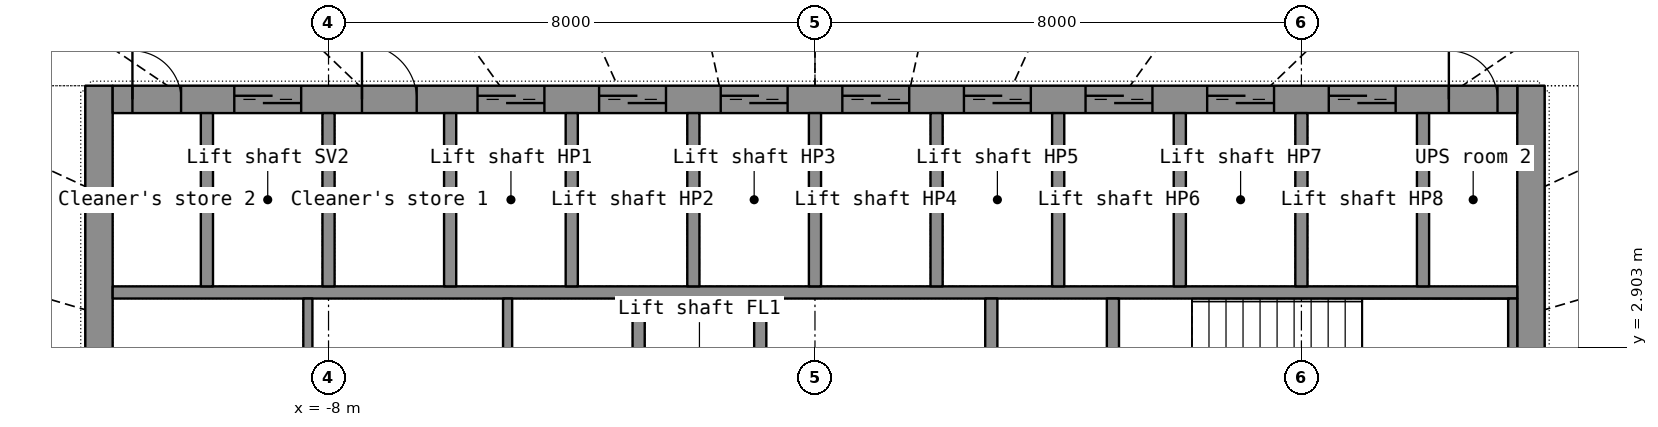
"""IFC4 building model, lengths in metres.
Left out: names, types, materials, properties, quantities, classifications, styles, units other than length and angle.
Written with IfcOpenShell. Run it as: python <this file> out.ifc"""

import sys

from ifc_helpers import new_model, si_unit, direction, frame, frame_2d, origin, place, context, subcontext, project, spatial, rectangle, extrude, element, fill, save


model = new_model("IFC4")
c1 = context("Model", 3, precision=1e-05, world=origin(), true_north=direction((0.0, 1.0)))
c2 = subcontext(c1, "Body", "Model", "MODEL_VIEW")
j1 = project(units=[si_unit("LENGTHUNIT", "METRE"), si_unit("PLANEANGLEUNIT", "RADIAN")], contexts=[c1])
p1 = place(None, origin())
s1 = spatial("IfcSite", under=j1, at=p1, CompositionType="ELEMENT")
p2 = place(p1, origin())
s2 = spatial("IfcBuilding", under=s1, at=p2, CompositionType="ELEMENT")
p3 = place(p2, frame((0.0, 0.0, 190.4)))
s3 = spatial("IfcBuildingStorey", under=s2, at=p3, CompositionType="ELEMENT", Elevation=190.4)
p4 = place(p3, frame((-11.775, -7.2, 0.0), z_axis=(0.0, 0.0, 1.0), x_axis=(0.0, 1.0, 0.0)))
e1 = element("IfcWall", 1, at=p4, inside=s3, PredefinedType="SHEAR", context=c2, shape_type="SweptSolid", body=[
    extrude(rectangle(XDim=14.4, YDim=0.45, at=frame_2d((7.2, 0.0))), origin(), (0.0, 0.0, 1.0), 3.3),
])
p5 = place(p4, frame((6.5, 0.0, 0.0)))
e2 = element("IfcOpeningElement", 2, at=p5, cuts=e1, PredefinedType="OPENING", context=c2, shape_type="SweptSolid", body=[
    extrude(rectangle(XDim=1.4, YDim=2.2, at=frame_2d((0.7, 1.1))), frame((0.0, 0.235, 0.0), z_axis=(0.0, -1.0, 0.0), x_axis=(1.0, 0.0, 0.0)), (0.0, 0.0, 1.0), 0.47),
])
p6 = place(p3, frame((11.775, -7.2, 0.0), z_axis=(0.0, 0.0, 1.0), x_axis=(0.0, 1.0, 0.0)))
e3 = element("IfcWall", 3, at=p6, inside=s3, PredefinedType="SHEAR", context=c2, shape_type="SweptSolid", body=[
    extrude(rectangle(XDim=14.4, YDim=0.45, at=frame_2d((7.2, 0.0))), origin(), (0.0, 0.0, 1.0), 3.3),
])
p7 = place(p6, frame((6.5, 0.0, 0.0)))
e4 = element("IfcOpeningElement", 4, at=p7, cuts=e3, PredefinedType="OPENING", context=c2, shape_type="SweptSolid", body=[
    extrude(rectangle(XDim=1.4, YDim=2.2, at=frame_2d((0.7, 1.1))), frame((0.0, 0.235, 0.0), z_axis=(0.0, -1.0, 0.0), x_axis=(1.0, 0.0, 0.0)), (0.0, 0.0, 1.0), 0.47),
])
p8 = place(p3, frame((-11.55, 6.975, 0.0), z_axis=(0.0, 0.0, 1.0), x_axis=(1.0, 0.0, 0.0)))
e5 = element("IfcWall", 5, at=p8, inside=s3, PredefinedType="SHEAR", context=c2, shape_type="SweptSolid", body=[
    extrude(rectangle(XDim=23.1, YDim=0.45, at=frame_2d((11.55, 0.0))), origin(), (0.0, 0.0, 1.0), 3.3),
])
p9 = place(p8, frame((2.0, 0.0, 0.0)))
e6 = element("IfcOpeningElement", 6, at=p9, cuts=e5, PredefinedType="OPENING", context=c2, shape_type="SweptSolid", body=[
    extrude(rectangle(XDim=1.1, YDim=2.2, at=frame_2d((0.55, 1.1))), frame((0.0, 0.235, 0.0), z_axis=(0.0, -1.0, 0.0), x_axis=(1.0, 0.0, 0.0)), (0.0, 0.0, 1.0), 0.47),
])
p10 = place(p8, frame((6.0, 0.0, 0.0)))
e7 = element("IfcOpeningElement", 7, at=p10, cuts=e5, PredefinedType="OPENING", context=c2, shape_type="SweptSolid", body=[
    extrude(rectangle(XDim=1.1, YDim=2.2, at=frame_2d((0.55, 1.1))), frame((0.0, 0.235, 0.0), z_axis=(0.0, -1.0, 0.0), x_axis=(1.0, 0.0, 0.0)), (0.0, 0.0, 1.0), 0.47),
])
p11 = place(p8, frame((8.0, 0.0, 0.0)))
e8 = element("IfcOpeningElement", 8, at=p11, cuts=e5, PredefinedType="OPENING", context=c2, shape_type="SweptSolid", body=[
    extrude(rectangle(XDim=1.1, YDim=2.2, at=frame_2d((0.55, 1.1))), frame((0.0, 0.235, 0.0), z_axis=(0.0, -1.0, 0.0), x_axis=(1.0, 0.0, 0.0)), (0.0, 0.0, 1.0), 0.47),
])
p12 = place(p8, frame((10.0, 0.0, 0.0)))
e9 = element("IfcOpeningElement", 9, at=p12, cuts=e5, PredefinedType="OPENING", context=c2, shape_type="SweptSolid", body=[
    extrude(rectangle(XDim=1.1, YDim=2.2, at=frame_2d((0.55, 1.1))), frame((0.0, 0.235, 0.0), z_axis=(0.0, -1.0, 0.0), x_axis=(1.0, 0.0, 0.0)), (0.0, 0.0, 1.0), 0.47),
])
p13 = place(p8, frame((12.0, 0.0, 0.0)))
e10 = element("IfcOpeningElement", 10, at=p13, cuts=e5, PredefinedType="OPENING", context=c2, shape_type="SweptSolid", body=[
    extrude(rectangle(XDim=1.1, YDim=2.2, at=frame_2d((0.55, 1.1))), frame((0.0, 0.235, 0.0), z_axis=(0.0, -1.0, 0.0), x_axis=(1.0, 0.0, 0.0)), (0.0, 0.0, 1.0), 0.47),
])
p14 = place(p8, frame((14.0, 0.0, 0.0)))
e11 = element("IfcOpeningElement", 11, at=p14, cuts=e5, PredefinedType="OPENING", context=c2, shape_type="SweptSolid", body=[
    extrude(rectangle(XDim=1.1, YDim=2.2, at=frame_2d((0.55, 1.1))), frame((0.0, 0.235, 0.0), z_axis=(0.0, -1.0, 0.0), x_axis=(1.0, 0.0, 0.0)), (0.0, 0.0, 1.0), 0.47),
])
p15 = place(p8, frame((16.0, 0.0, 0.0)))
e12 = element("IfcOpeningElement", 12, at=p15, cuts=e5, PredefinedType="OPENING", context=c2, shape_type="SweptSolid", body=[
    extrude(rectangle(XDim=1.1, YDim=2.2, at=frame_2d((0.55, 1.1))), frame((0.0, 0.235, 0.0), z_axis=(0.0, -1.0, 0.0), x_axis=(1.0, 0.0, 0.0)), (0.0, 0.0, 1.0), 0.47),
])
p16 = place(p8, frame((18.0, 0.0, 0.0)))
e13 = element("IfcOpeningElement", 13, at=p16, cuts=e5, PredefinedType="OPENING", context=c2, shape_type="SweptSolid", body=[
    extrude(rectangle(XDim=1.1, YDim=2.2, at=frame_2d((0.55, 1.1))), frame((0.0, 0.235, 0.0), z_axis=(0.0, -1.0, 0.0), x_axis=(1.0, 0.0, 0.0)), (0.0, 0.0, 1.0), 0.47),
])
p17 = place(p8, frame((20.0, 0.0, 0.0)))
e14 = element("IfcOpeningElement", 14, at=p17, cuts=e5, PredefinedType="OPENING", context=c2, shape_type="SweptSolid", body=[
    extrude(rectangle(XDim=1.1, YDim=2.2, at=frame_2d((0.55, 1.1))), frame((0.0, 0.235, 0.0), z_axis=(0.0, -1.0, 0.0), x_axis=(1.0, 0.0, 0.0)), (0.0, 0.0, 1.0), 0.47),
])
p18 = place(p8, frame((4.1, 0.0, 0.0)))
e15 = element("IfcOpeningElement", 15, at=p18, cuts=e5, PredefinedType="OPENING", context=c2, shape_type="SweptSolid", body=[
    extrude(rectangle(XDim=0.9, YDim=2.1, at=frame_2d((0.45, 1.05))), frame((0.0, 0.235, 0.0), z_axis=(0.0, -1.0, 0.0), x_axis=(1.0, 0.0, 0.0)), (0.0, 0.0, 1.0), 0.47),
])
p19 = place(p8, frame((0.325, 0.0, 0.0)))
e16 = element("IfcOpeningElement", 16, at=p19, cuts=e5, PredefinedType="OPENING", context=c2, shape_type="SweptSolid", body=[
    extrude(rectangle(XDim=0.8, YDim=2.05, at=frame_2d((0.4, 1.025))), frame((0.0, 0.235, 0.0), z_axis=(0.0, -1.0, 0.0), x_axis=(1.0, 0.0, 0.0)), (0.0, 0.0, 1.0), 0.47),
])
p20 = place(p8, frame((21.975, 0.0, 0.0)))
e17 = element("IfcOpeningElement", 17, at=p20, cuts=e5, PredefinedType="OPENING", context=c2, shape_type="SweptSolid", body=[
    extrude(rectangle(XDim=0.8, YDim=2.05, at=frame_2d((0.4, 1.025))), frame((0.0, 0.235, 0.0), z_axis=(0.0, -1.0, 0.0), x_axis=(1.0, 0.0, 0.0)), (0.0, 0.0, 1.0), 0.47),
])
p21 = place(p3, frame((-11.55, 3.8, 0.0), z_axis=(0.0, 0.0, 1.0), x_axis=(1.0, 0.0, 0.0)))
e18 = element("IfcWall", 18, at=p21, inside=s3, PredefinedType="SHEAR", context=c2, shape_type="SweptSolid", body=[
    extrude(rectangle(XDim=23.1, YDim=0.2, at=frame_2d((11.55, 0.0))), origin(), (0.0, 0.0, 1.0), 3.3),
])
for number, where, z_axis, x_axis in (
    (19, (-10.0, 3.9, 0.0), (0.0, 0.0, 1.0), (0.0, 1.0, 0.0)),
    (20, (-8.0, 3.9, 0.0), (0.0, 0.0, 1.0), (0.0, 1.0, 0.0)),
    (21, (-6.0, 3.9, 0.0), (0.0, 0.0, 1.0), (0.0, 1.0, 0.0)),
    (22, (-4.0, 3.9, 0.0), (0.0, 0.0, 1.0), (0.0, 1.0, 0.0)),
    (23, (-2.0, 3.9, 0.0), (0.0, 0.0, 1.0), (0.0, 1.0, 0.0)),
    (24, (0.0, 3.9, 0.0), (0.0, 0.0, 1.0), (0.0, 1.0, 0.0)),
    (25, (2.0, 3.9, 0.0), (0.0, 0.0, 1.0), (0.0, 1.0, 0.0)),
    (26, (4.0, 3.9, 0.0), (0.0, 0.0, 1.0), (0.0, 1.0, 0.0)),
    (27, (6.0, 3.9, 0.0), (0.0, 0.0, 1.0), (0.0, 1.0, 0.0)),
    (28, (8.0, 3.9, 0.0), (0.0, 0.0, 1.0), (0.0, 1.0, 0.0)),
    (29, (10.0, 3.9, 0.0), (0.0, 0.0, 1.0), (0.0, 1.0, 0.0)),
):
    element("IfcWall", number, at=place(p3, frame(where, z_axis=z_axis, x_axis=x_axis)), inside=s3, PredefinedType="SHEAR", context=c2, shape_type="SweptSolid", body=[
        extrude(rectangle(XDim=2.85, YDim=0.2, at=frame_2d((1.425, 0.0))), origin(), (0.0, 0.0, 1.0), 3.3),
    ])
p22 = place(p3, frame((-2.9, -3.7, 0.0), z_axis=(0.0, 0.0, 1.0), x_axis=(0.0, 1.0, 0.0)))
e30 = element("IfcWall", 30, at=p22, inside=s3, PredefinedType="SHEAR", context=c2, shape_type="SweptSolid", body=[
    extrude(rectangle(XDim=7.4, YDim=0.2, at=frame_2d((3.7, 0.0))), origin(), (0.0, 0.0, 1.0), 3.3),
])
p23 = place(p22, frame((3.1, 0.0, 0.0)))
e31 = element("IfcOpeningElement", 31, at=p23, cuts=e30, PredefinedType="OPENING", context=c2, shape_type="SweptSolid", body=[
    extrude(rectangle(XDim=1.2, YDim=2.2, at=frame_2d((0.6, 1.1))), frame((0.0, 0.11, 0.0), z_axis=(0.0, -1.0, 0.0), x_axis=(1.0, 0.0, 0.0)), (0.0, 0.0, 1.0), 0.22),
])
p24 = place(p3, frame((2.9, -3.7, 0.0), z_axis=(0.0, 0.0, 1.0), x_axis=(0.0, 1.0, 0.0)))
e32 = element("IfcWall", 32, at=p24, inside=s3, PredefinedType="SHEAR", context=c2, shape_type="SweptSolid", body=[
    extrude(rectangle(XDim=7.4, YDim=0.2, at=frame_2d((3.7, 0.0))), origin(), (0.0, 0.0, 1.0), 3.3),
])
p25 = place(p24, frame((3.1, 0.0, 0.0)))
e33 = element("IfcOpeningElement", 33, at=p25, cuts=e32, PredefinedType="OPENING", context=c2, shape_type="SweptSolid", body=[
    extrude(rectangle(XDim=1.2, YDim=2.2, at=frame_2d((0.6, 1.1))), frame((0.0, 0.11, 0.0), z_axis=(0.0, -1.0, 0.0), x_axis=(1.0, 0.0, 0.0)), (0.0, 0.0, 1.0), 0.22),
])
p26 = place(p3, frame((-0.9, 1.35, 0.0), z_axis=(0.0, 0.0, 1.0), x_axis=(0.0, 1.0, 0.0)))
e34 = element("IfcWall", 34, at=p26, inside=s3, PredefinedType="SHEAR", context=c2, shape_type="SweptSolid", body=[
    extrude(rectangle(XDim=2.35, YDim=0.2, at=frame_2d((1.175, 0.0))), origin(), (0.0, 0.0, 1.0), 3.3),
])
p27 = place(p3, frame((11.475, 1.35, 0.0), z_axis=(0.0, 0.0, 1.0), x_axis=(0.0, 1.0, 0.0)))
e35 = element("IfcWall", 35, at=p27, inside=s3, PredefinedType="SHEAR", context=c2, shape_type="SweptSolid", body=[
    extrude(rectangle(XDim=2.35, YDim=0.15, at=frame_2d((1.175, 0.0))), origin(), (0.0, 0.0, 1.0), 3.3),
])
p28 = place(p3, frame((4.9, 1.35, 0.0), z_axis=(0.0, 0.0, 1.0), x_axis=(0.0, 1.0, 0.0)))
e36 = element("IfcWall", 36, at=p28, inside=s3, PredefinedType="SHEAR", context=c2, shape_type="SweptSolid", body=[
    extrude(rectangle(XDim=2.35, YDim=0.2, at=frame_2d((1.175, 0.0))), origin(), (0.0, 0.0, 1.0), 3.3),
])
for number, where, z_axis, x_axis in (
    (37, (-8.34, 1.35, 0.0), (0.0, 0.0, 1.0), (0.0, 1.0, 0.0)),
    (38, (-5.055, 1.35, 0.0), (0.0, 0.0, 1.0), (0.0, 1.0, 0.0)),
):
    element("IfcWall", number, at=place(p3, frame(where, z_axis=z_axis, x_axis=x_axis)), inside=s3, PredefinedType="PARTITIONING", context=c2, shape_type="SweptSolid", body=[
        extrude(rectangle(XDim=2.35, YDim=0.15, at=frame_2d((1.175, 0.0))), origin(), (0.0, 0.0, 1.0), 3.3),
    ])
p29 = place(p9, origin())
e39 = element("IfcDoor", 39, at=p29, inside=s3, OperationType="DOUBLE_DOOR_SLIDING", PredefinedType="DOOR", context=c2, shape_type="SweptSolid", body=[
    extrude(rectangle(XDim=1.1, YDim=2.2, at=frame_2d((0.55, 1.1))), frame((0.0, 0.025, 0.0), z_axis=(0.0, -1.0, 0.0), x_axis=(1.0, 0.0, 0.0)), (0.0, 0.0, 1.0), 0.05),
])
fill(e6, e39)
p30 = place(p10, origin())
e40 = element("IfcDoor", 40, at=p30, inside=s3, OperationType="DOUBLE_DOOR_SLIDING", PredefinedType="DOOR", context=c2, shape_type="SweptSolid", body=[
    extrude(rectangle(XDim=1.1, YDim=2.2, at=frame_2d((0.55, 1.1))), frame((0.0, 0.025, 0.0), z_axis=(0.0, -1.0, 0.0), x_axis=(1.0, 0.0, 0.0)), (0.0, 0.0, 1.0), 0.05),
])
fill(e7, e40)
p31 = place(p11, origin())
e41 = element("IfcDoor", 41, at=p31, inside=s3, OperationType="DOUBLE_DOOR_SLIDING", PredefinedType="DOOR", context=c2, shape_type="SweptSolid", body=[
    extrude(rectangle(XDim=1.1, YDim=2.2, at=frame_2d((0.55, 1.1))), frame((0.0, 0.025, 0.0), z_axis=(0.0, -1.0, 0.0), x_axis=(1.0, 0.0, 0.0)), (0.0, 0.0, 1.0), 0.05),
])
fill(e8, e41)
p32 = place(p12, origin())
e42 = element("IfcDoor", 42, at=p32, inside=s3, OperationType="DOUBLE_DOOR_SLIDING", PredefinedType="DOOR", context=c2, shape_type="SweptSolid", body=[
    extrude(rectangle(XDim=1.1, YDim=2.2, at=frame_2d((0.55, 1.1))), frame((0.0, 0.025, 0.0), z_axis=(0.0, -1.0, 0.0), x_axis=(1.0, 0.0, 0.0)), (0.0, 0.0, 1.0), 0.05),
])
fill(e9, e42)
p33 = place(p13, origin())
e43 = element("IfcDoor", 43, at=p33, inside=s3, OperationType="DOUBLE_DOOR_SLIDING", PredefinedType="DOOR", context=c2, shape_type="SweptSolid", body=[
    extrude(rectangle(XDim=1.1, YDim=2.2, at=frame_2d((0.55, 1.1))), frame((0.0, 0.025, 0.0), z_axis=(0.0, -1.0, 0.0), x_axis=(1.0, 0.0, 0.0)), (0.0, 0.0, 1.0), 0.05),
])
fill(e10, e43)
p34 = place(p14, origin())
e44 = element("IfcDoor", 44, at=p34, inside=s3, OperationType="DOUBLE_DOOR_SLIDING", PredefinedType="DOOR", context=c2, shape_type="SweptSolid", body=[
    extrude(rectangle(XDim=1.1, YDim=2.2, at=frame_2d((0.55, 1.1))), frame((0.0, 0.025, 0.0), z_axis=(0.0, -1.0, 0.0), x_axis=(1.0, 0.0, 0.0)), (0.0, 0.0, 1.0), 0.05),
])
fill(e11, e44)
p35 = place(p15, origin())
e45 = element("IfcDoor", 45, at=p35, inside=s3, OperationType="DOUBLE_DOOR_SLIDING", PredefinedType="DOOR", context=c2, shape_type="SweptSolid", body=[
    extrude(rectangle(XDim=1.1, YDim=2.2, at=frame_2d((0.55, 1.1))), frame((0.0, 0.025, 0.0), z_axis=(0.0, -1.0, 0.0), x_axis=(1.0, 0.0, 0.0)), (0.0, 0.0, 1.0), 0.05),
])
fill(e12, e45)
p36 = place(p16, origin())
e46 = element("IfcDoor", 46, at=p36, inside=s3, OperationType="DOUBLE_DOOR_SLIDING", PredefinedType="DOOR", context=c2, shape_type="SweptSolid", body=[
    extrude(rectangle(XDim=1.1, YDim=2.2, at=frame_2d((0.55, 1.1))), frame((0.0, 0.025, 0.0), z_axis=(0.0, -1.0, 0.0), x_axis=(1.0, 0.0, 0.0)), (0.0, 0.0, 1.0), 0.05),
])
fill(e13, e46)
p37 = place(p17, origin())
e47 = element("IfcDoor", 47, at=p37, inside=s3, OperationType="DOUBLE_DOOR_SLIDING", PredefinedType="DOOR", context=c2, shape_type="SweptSolid", body=[
    extrude(rectangle(XDim=1.1, YDim=2.2, at=frame_2d((0.55, 1.1))), frame((0.0, 0.025, 0.0), z_axis=(0.0, -1.0, 0.0), x_axis=(1.0, 0.0, 0.0)), (0.0, 0.0, 1.0), 0.05),
])
fill(e14, e47)
p38 = place(p18, origin())
e48 = element("IfcDoor", 48, at=p38, inside=s3, OperationType="SINGLE_SWING_LEFT", PredefinedType="DOOR", context=c2, shape_type="SweptSolid", body=[
    extrude(rectangle(XDim=0.9, YDim=2.1, at=frame_2d((0.45, 1.05))), frame((0.0, 0.025, 0.0), z_axis=(0.0, -1.0, 0.0), x_axis=(1.0, 0.0, 0.0)), (0.0, 0.0, 1.0), 0.05),
])
fill(e15, e48)
p39 = place(p19, origin())
e49 = element("IfcDoor", 49, at=p39, inside=s3, OperationType="SINGLE_SWING_LEFT", PredefinedType="DOOR", context=c2, shape_type="SweptSolid", body=[
    extrude(rectangle(XDim=0.8, YDim=2.05, at=frame_2d((0.4, 1.025))), frame((0.0, 0.025, 0.0), z_axis=(0.0, -1.0, 0.0), x_axis=(1.0, 0.0, 0.0)), (0.0, 0.0, 1.0), 0.05),
])
fill(e16, e49)
p40 = place(p20, origin())
e50 = element("IfcDoor", 50, at=p40, inside=s3, OperationType="SINGLE_SWING_LEFT", PredefinedType="DOOR", context=c2, shape_type="SweptSolid", body=[
    extrude(rectangle(XDim=0.8, YDim=2.05, at=frame_2d((0.4, 1.025))), frame((0.0, 0.025, 0.0), z_axis=(0.0, -1.0, 0.0), x_axis=(1.0, 0.0, 0.0)), (0.0, 0.0, 1.0), 0.05),
])
fill(e17, e50)
save(model, sys.argv[1])
